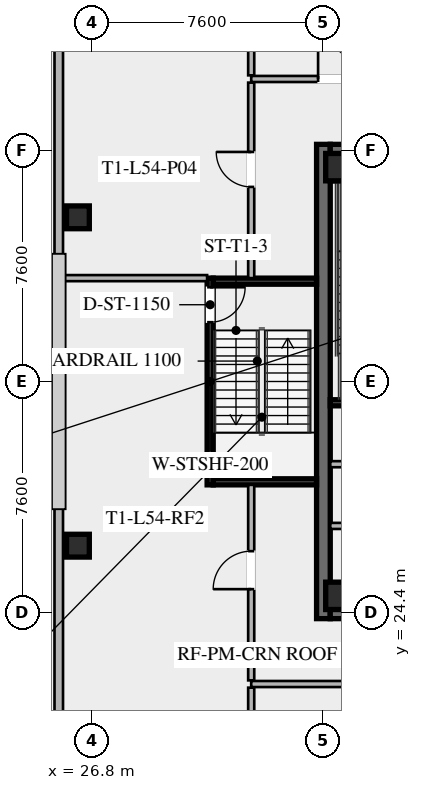
"""IFC4 building model, lengths in metres.
Left out: names, types, materials, properties, quantities, classifications, styles, units other than length and angle.
Written with IfcOpenShell. Run it as: python <this file> out.ifc"""

import sys

from ifc_helpers import new_model, si_unit, direction, frame, frame_2d, origin, origin_2d, place, context, subcontext, project, spatial, rectangle, hollow_rectangle, extrude, element, fill, save


model = new_model("IFC4")
c1 = context("Model", 3, precision=1e-05, world=origin(), true_north=direction((0.0, 1.0)))
c2 = subcontext(c1, "Body", "Model", "MODEL_VIEW")
j1 = project(units=[si_unit("LENGTHUNIT", "METRE"), si_unit("PLANEANGLEUNIT", "RADIAN")], contexts=[c1])
p1 = place(None, origin())
s1 = spatial("IfcSite", under=j1, at=p1, CompositionType="ELEMENT")
p2 = place(p1, origin())
s2 = spatial("IfcBuilding", under=s1, at=p2, CompositionType="ELEMENT")
p3 = place(p2, frame((0.0, 0.0, 199.6)))
s3 = spatial("IfcBuildingStorey", under=s2, at=p3, CompositionType="ELEMENT", Elevation=199.6)
p4 = place(p3, frame((34.425, 24.2, 0.0), z_axis=(0.0, 0.0, 1.0), x_axis=(0.0, 1.0, 0.0)))
e1 = element("IfcWall", 1, at=p4, inside=s3, PredefinedType="SHEAR", context=c2, shape_type="SweptSolid", body=[
    extrude(rectangle(XDim=15.6, YDim=0.45, at=frame_2d((7.8, 0.0))), origin(), (0.0, 0.0, 1.0), 4.6),
])
p5 = place(p3, frame((49.35, 24.425, 0.0), z_axis=(0.0, 0.0, 1.0), x_axis=(-1.0, 0.0, 0.0)))
e2 = element("IfcWall", 2, at=p5, inside=s3, PredefinedType="SHEAR", context=c2, shape_type="SweptSolid", body=[
    extrude(rectangle(XDim=14.7, YDim=0.45, at=frame_2d((7.35, 0.0))), origin(), (0.0, 0.0, 1.0), 4.6),
])
p6 = place(p5, frame((9.05, 0.0, 0.0)))
e3 = element("IfcOpeningElement", 3, at=p6, cuts=e2, PredefinedType="OPENING", context=c2, shape_type="SweptSolid", body=[
    extrude(rectangle(XDim=1.25, YDim=2.25, at=frame_2d((0.625, 1.125))), frame((0.0, 0.235, 0.0), z_axis=(0.0, -1.0, 0.0), x_axis=(1.0, 0.0, 0.0)), (0.0, 0.0, 1.0), 0.47),
])
p7 = place(p5, frame((4.0, 0.0, 0.0)))
e4 = element("IfcOpeningElement", 4, at=p7, cuts=e2, PredefinedType="OPENING", context=c2, shape_type="SweptSolid", body=[
    extrude(rectangle(XDim=1.25, YDim=2.25, at=frame_2d((0.625, 1.125))), frame((0.0, 0.235, 0.0), z_axis=(0.0, -1.0, 0.0), x_axis=(1.0, 0.0, 0.0)), (0.0, 0.0, 1.0), 0.47),
])
p8 = place(p3, frame((34.65, 39.575, 0.0), z_axis=(0.0, 0.0, 1.0), x_axis=(1.0, 0.0, 0.0)))
e5 = element("IfcWall", 5, at=p8, inside=s3, PredefinedType="SHEAR", context=c2, shape_type="SweptSolid", body=[
    extrude(rectangle(XDim=14.7, YDim=0.45, at=frame_2d((7.35, 0.0))), origin(), (0.0, 0.0, 1.0), 4.6),
])
p9 = place(p8, frame((4.4, 0.0, 0.0)))
e6 = element("IfcOpeningElement", 6, at=p9, cuts=e5, PredefinedType="OPENING", context=c2, shape_type="SweptSolid", body=[
    extrude(rectangle(XDim=1.25, YDim=2.25, at=frame_2d((0.625, 1.125))), frame((0.0, 0.235, 0.0), z_axis=(0.0, -1.0, 0.0), x_axis=(1.0, 0.0, 0.0)), (0.0, 0.0, 1.0), 0.47),
])
p10 = place(p8, frame((9.45, 0.0, 0.0)))
e7 = element("IfcOpeningElement", 7, at=p10, cuts=e5, PredefinedType="OPENING", context=c2, shape_type="SweptSolid", body=[
    extrude(rectangle(XDim=1.25, YDim=2.25, at=frame_2d((0.625, 1.125))), frame((0.0, 0.235, 0.0), z_axis=(0.0, -1.0, 0.0), x_axis=(1.0, 0.0, 0.0)), (0.0, 0.0, 1.0), 0.47),
])
for number, where, z_axis, x_axis in (
    (8, (34.95, 24.95, 0.0), (0.0, 0.0, 1.0), (1.0, 0.0, 0.0)),
    (9, (34.95, 39.05, 0.0), (0.0, 0.0, 1.0), (1.0, 0.0, 0.0)),
):
    element("IfcColumn", number, at=place(p3, frame(where, z_axis=z_axis, x_axis=x_axis)), inside=s3, PredefinedType="COLUMN", context=c2, shape_type="SweptSolid", body=[
        extrude(hollow_rectangle(XDim=0.9, YDim=0.9, WallThickness=0.04, at=origin_2d()), origin(), (0.0, 0.0, 1.0), 4.42),
    ])
for number, where, z_axis, x_axis in (
    (10, (26.35, 37.4, -0.295), (0.0, 0.0, 1.0), (1.0, 0.0, 0.0)),
    (11, (26.35, 26.6, -0.295), (0.0, 0.0, 1.0), (1.0, 0.0, 0.0)),
):
    element("IfcColumn", number, at=place(p3, frame(where, z_axis=z_axis, x_axis=x_axis)), inside=s3, PredefinedType="COLUMN", context=c2, shape_type="SweptSolid", body=[
        extrude(hollow_rectangle(XDim=0.75, YDim=0.75, WallThickness=0.032, at=origin_2d()), origin(), (0.0, 0.0, 1.0), 4.715),
    ])
p11 = place(p3, frame((25.72, 17.82, 0.0), z_axis=(0.0, 0.0, 1.0), x_axis=(0.0, 1.0, 0.0)))
e12 = element("IfcWall", 12, at=p11, inside=s3, PredefinedType="SOLIDWALL", context=c2, shape_type="SweptSolid", body=[
    extrude(rectangle(XDim=28.36, YDim=0.28, at=frame_2d((14.18, 0.0))), origin(), (0.0, 0.0, 1.0), 4.42),
])
for number, where, z_axis, x_axis in (
    (13, (34.65, 31.3, 0.0), (0.0, 0.0, 1.0), (1.0, 0.0, 0.0)),
    (14, (34.65, 38.7, 0.0), (0.0, 0.0, 1.0), (1.0, 0.0, 0.0)),
):
    element("IfcWall", number, at=place(p3, frame(where, z_axis=z_axis, x_axis=x_axis)), inside=s3, PredefinedType="SHEAR", context=c2, shape_type="SweptSolid", body=[
        extrude(rectangle(XDim=3.65, YDim=0.2, at=frame_2d((1.825, 0.0))), origin(), (0.0, 0.0, 1.0), 4.42),
    ])
for number, where, z_axis, x_axis in (
    (15, (34.65, 27.25, 0.0), (0.0, 0.0, 1.0), (1.0, 0.0, 0.0)),
    (16, (34.65, 29.28, 0.0), (0.0, 0.0, 1.0), (1.0, 0.0, 0.0)),
):
    element("IfcWall", number, at=place(p3, frame(where, z_axis=z_axis, x_axis=x_axis)), inside=s3, PredefinedType="SOLIDWALL", context=c2, shape_type="SweptSolid", body=[
        extrude(rectangle(XDim=3.3, YDim=0.2, at=frame_2d((1.65, 0.0))), origin(), (0.0, 0.0, 1.0), 4.42),
    ])
p12 = place(p3, frame((30.7, 35.4, 0.0), z_axis=(0.0, 0.0, 1.0), x_axis=(0.0, -1.0, 0.0)))
e17 = element("IfcWall", 17, at=p12, inside=s3, PredefinedType="SHEAR", context=c2, shape_type="SweptSolid", body=[
    extrude(rectangle(XDim=6.8, YDim=0.2, at=frame_2d((3.4, 0.0))), origin(), (0.0, 0.0, 1.0), 4.42),
])
p13 = place(p12, frame((0.3, 0.0, 0.0)))
e18 = element("IfcOpeningElement", 18, at=p13, cuts=e17, PredefinedType="OPENING", context=c2, shape_type="SweptSolid", body=[
    extrude(rectangle(XDim=1.15, YDim=2.2, at=frame_2d((0.575, 1.1))), frame((0.0, 0.11, 0.0), z_axis=(0.0, -1.0, 0.0), x_axis=(1.0, 0.0, 0.0)), (0.0, 0.0, 1.0), 0.22),
])
for number, where, z_axis, x_axis in (
    (19, (34.2, 35.3, 0.0), (0.0, 0.0, 1.0), (-1.0, 0.0, 0.0)),
    (20, (30.8, 28.7, 0.0), (0.0, 0.0, 1.0), (1.0, 0.0, 0.0)),
):
    element("IfcWall", number, at=place(p3, frame(where, z_axis=z_axis, x_axis=x_axis)), inside=s3, PredefinedType="SHEAR", context=c2, shape_type="SweptSolid", body=[
        extrude(rectangle(XDim=3.4, YDim=0.2, at=frame_2d((1.7, 0.0))), origin(), (0.0, 0.0, 1.0), 4.42),
    ])
p14 = place(p3, frame((32.05, 41.95, 0.0), z_axis=(0.0, 0.0, 1.0), x_axis=(1.0, 0.0, 0.0)))
e21 = element("IfcWall", 21, at=p14, inside=s3, PredefinedType="SOLIDWALL", context=c2, shape_type="SweptSolid", body=[
    extrude(rectangle(XDim=19.9, YDim=0.2, at=frame_2d((9.95, 0.0))), origin(), (0.0, 0.0, 1.0), 3.531),
])
p15 = place(p14, frame((2.2, 0.0, 0.0)))
e22 = element("IfcOpeningElement", 22, at=p15, cuts=e21, PredefinedType="OPENING", context=c2, shape_type="SweptSolid", body=[
    extrude(rectangle(XDim=1.15, YDim=2.2, at=frame_2d((0.575, 1.1))), frame((0.0, 0.11, 0.0), z_axis=(0.0, -1.0, 0.0), x_axis=(1.0, 0.0, 0.0)), (0.0, 0.0, 1.0), 0.22),
])
p16 = place(p3, frame((51.95, 22.05, 0.0), z_axis=(0.0, 0.0, 1.0), x_axis=(-1.0, 0.0, 0.0)))
e23 = element("IfcWall", 23, at=p16, inside=s3, PredefinedType="SOLIDWALL", context=c2, shape_type="SweptSolid", body=[
    extrude(rectangle(XDim=19.9, YDim=0.2, at=frame_2d((9.95, 0.0))), origin(), (0.0, 0.0, 1.0), 3.531),
])
p17 = place(p16, frame((2.2, 0.0, 0.0)))
e24 = element("IfcOpeningElement", 24, at=p17, cuts=e23, PredefinedType="OPENING", context=c2, shape_type="SweptSolid", body=[
    extrude(rectangle(XDim=1.15, YDim=2.2, at=frame_2d((0.575, 1.1))), frame((0.0, 0.11, 0.0), z_axis=(0.0, -1.0, 0.0), x_axis=(1.0, 0.0, 0.0)), (0.0, 0.0, 1.0), 0.22),
])
p18 = place(p3, frame((32.05, 22.17, 0.0), z_axis=(0.0, 0.0, 1.0), x_axis=(0.0, 1.0, 0.0)))
e25 = element("IfcWall", 25, at=p18, inside=s3, PredefinedType="SOLIDWALL", context=c2, shape_type="SweptSolid", body=[
    extrude(rectangle(XDim=6.43, YDim=0.2, at=frame_2d((3.215, 0.0))), origin(), (0.0, 0.0, 1.0), 3.531),
])
p19 = place(p18, frame((3.0, 0.0, 0.0)))
e26 = element("IfcOpeningElement", 26, at=p19, cuts=e25, PredefinedType="OPENING", context=c2, shape_type="SweptSolid", body=[
    extrude(rectangle(XDim=1.25, YDim=2.25, at=frame_2d((0.625, 1.125))), frame((0.0, 0.11, 0.0), z_axis=(0.0, -1.0, 0.0), x_axis=(1.0, 0.0, 0.0)), (0.0, 0.0, 1.0), 0.22),
])
p20 = place(p3, frame((32.05, 35.4, 0.0), z_axis=(0.0, 0.0, 1.0), x_axis=(0.0, 1.0, 0.0)))
e27 = element("IfcWall", 27, at=p20, inside=s3, PredefinedType="SOLIDWALL", context=c2, shape_type="SweptSolid", body=[
    extrude(rectangle(XDim=6.43, YDim=0.2, at=frame_2d((3.215, 0.0))), origin(), (0.0, 0.0, 1.0), 3.531),
])
p21 = place(p20, frame((3.0, 0.0, 0.0)))
e28 = element("IfcOpeningElement", 28, at=p21, cuts=e27, PredefinedType="OPENING", context=c2, shape_type="SweptSolid", body=[
    extrude(rectangle(XDim=1.15, YDim=2.2, at=frame_2d((0.575, 1.1))), frame((0.0, 0.11, 0.0), z_axis=(0.0, -1.0, 0.0), x_axis=(1.0, 0.0, 0.0)), (0.0, 0.0, 1.0), 0.22),
])
for number, where, z_axis, x_axis in (
    (29, (32.05, 42.07, 0.0), (0.0, 0.0, 1.0), (0.0, 1.0, 0.0)),
    (30, (32.05, 21.93, 0.0), (0.0, 0.0, 1.0), (0.0, -1.0, 0.0)),
):
    element("IfcWall", number, at=place(p3, frame(where, z_axis=z_axis, x_axis=x_axis)), inside=s3, PredefinedType="SOLIDWALL", context=c2, shape_type="SweptSolid", body=[
        extrude(rectangle(XDim=6.21, YDim=0.2, at=frame_2d((3.105, 0.0))), origin(), (0.0, 0.0, 1.0), 3.531),
    ])
p22 = place(p3, frame((25.72, 35.4, 0.0), z_axis=(0.0, 0.0, 1.0), x_axis=(1.0, 0.0, 0.0)))
e31 = element("IfcWall", 31, at=p22, inside=s3, PredefinedType="SOLIDWALL", context=c2, shape_type="SweptSolid", body=[
    extrude(rectangle(XDim=4.88, YDim=0.2, at=frame_2d((2.44, 0.0))), origin(), (0.0, 0.0, 1.0), 3.531),
])
p23 = place(p13, origin())
e32 = element("IfcDoor", 32, at=p23, inside=s3, OperationType="SINGLE_SWING_LEFT", PredefinedType="DOOR", context=c2, shape_type="SweptSolid", body=[
    extrude(rectangle(XDim=1.15, YDim=2.2, at=frame_2d((0.575, 1.1))), frame((0.0, 0.025, 0.0), z_axis=(0.0, -1.0, 0.0), x_axis=(1.0, 0.0, 0.0)), (0.0, 0.0, 1.0), 0.05),
])
fill(e18, e32)
p24 = place(p15, origin())
e33 = element("IfcDoor", 33, at=p24, inside=s3, OperationType="SINGLE_SWING_LEFT", PredefinedType="DOOR", context=c2, shape_type="SweptSolid", body=[
    extrude(rectangle(XDim=1.15, YDim=2.2, at=frame_2d((0.575, 1.1))), frame((0.0, 0.025, 0.0), z_axis=(0.0, -1.0, 0.0), x_axis=(1.0, 0.0, 0.0)), (0.0, 0.0, 1.0), 0.05),
])
fill(e22, e33)
p25 = place(p19, origin())
e34 = element("IfcDoor", 34, at=p25, inside=s3, OperationType="SINGLE_SWING_LEFT", PredefinedType="DOOR", context=c2, shape_type="SweptSolid", body=[
    extrude(rectangle(XDim=1.25, YDim=2.25, at=frame_2d((0.625, 1.125))), frame((0.0, 0.025, 0.0), z_axis=(0.0, -1.0, 0.0), x_axis=(1.0, 0.0, 0.0)), (0.0, 0.0, 1.0), 0.05),
])
fill(e26, e34)
p26 = place(p21, origin())
e35 = element("IfcDoor", 35, at=p26, inside=s3, OperationType="SINGLE_SWING_RIGHT", PredefinedType="DOOR", context=c2, shape_type="SweptSolid", body=[
    extrude(rectangle(XDim=1.15, YDim=2.2, at=frame_2d((0.575, 1.1))), frame((0.0, 0.025, 0.0), z_axis=(0.0, -1.0, 0.0), x_axis=(1.0, 0.0, 0.0)), (0.0, 0.0, 1.0), 0.05),
])
fill(e28, e35)
save(model, sys.argv[1])
